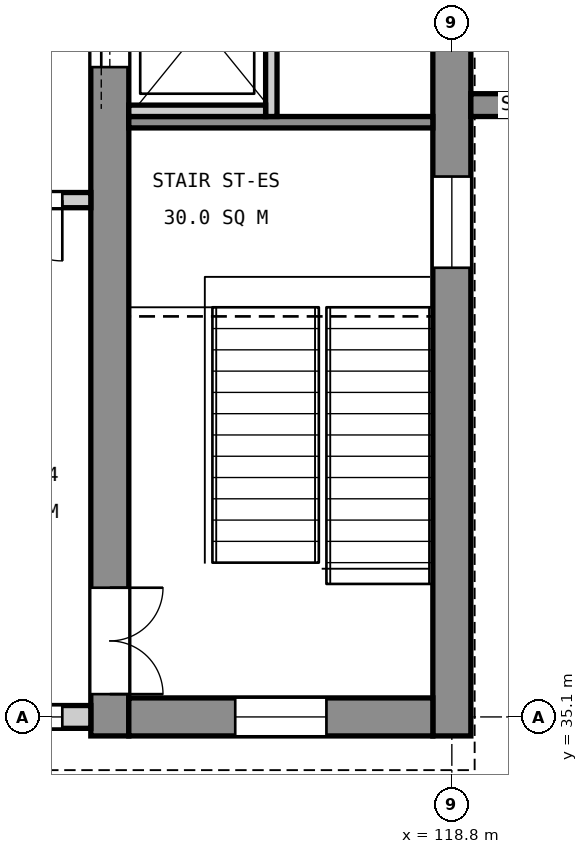
"""IFC4 building model, lengths in metres.
Left out: names, types, materials, properties, quantities, classifications, styles, units other than length and angle.
Written with IfcOpenShell. Run it as: python <this file> out.ifc"""

import sys

from ifc_helpers import new_model, si_unit, direction, frame, frame_2d, origin, place, context, subcontext, project, spatial, rectangle, extrude, element, fill, save


model = new_model("IFC4")
c1 = context("Model", 3, precision=1e-05, world=origin(), true_north=direction((0.0, 1.0)))
c2 = subcontext(c1, "Body", "Model", "MODEL_VIEW")
j1 = project(units=[si_unit("LENGTHUNIT", "METRE"), si_unit("PLANEANGLEUNIT", "RADIAN")], contexts=[c1])
p1 = place(None, origin())
s1 = spatial("IfcSite", under=j1, at=p1, CompositionType="ELEMENT")
p2 = place(p1, origin())
s2 = spatial("IfcBuilding", under=s1, at=p2, CompositionType="ELEMENT")
p3 = place(p2, frame((0.0, 0.0, 27.0)))
s3 = spatial("IfcBuildingStorey", under=s2, at=p3, CompositionType="ELEMENT", Elevation=27.0)
p4 = place(p3, frame((118.8, 34.85, 0.0), z_axis=(0.0, 0.0, 1.0), x_axis=(0.0, 1.0, 0.0)))
e1 = element("IfcWall", 1, at=p4, inside=s3, PredefinedType="SHEAR", context=c2, shape_type="SweptSolid", body=[
    extrude(rectangle(XDim=11.3, YDim=0.5, at=frame_2d((5.65, 0.0))), origin(), (0.0, 0.0, 1.0), 4.55),
])
p5 = place(p4, frame((6.16, 0.0, 3.4)))
e2 = element("IfcOpeningElement", 2, at=p5, cuts=e1, PredefinedType="OPENING", context=c2, shape_type="SweptSolid", body=[
    extrude(rectangle(XDim=1.2, YDim=0.9, at=frame_2d((0.6, 0.45))), frame((0.0, 0.26, 0.0), z_axis=(0.0, -1.0, 0.0), x_axis=(1.0, 0.0, 0.0)), (0.0, 0.0, 1.0), 0.52),
])
p6 = place(p3, frame((114.3, 34.85, 0.0), z_axis=(0.0, 0.0, 1.0), x_axis=(0.0, 1.0, 0.0)))
e3 = element("IfcWall", 3, at=p6, inside=s3, PredefinedType="SHEAR", context=c2, shape_type="SweptSolid", body=[
    extrude(rectangle(XDim=11.3, YDim=0.5, at=frame_2d((5.65, 0.0))), origin(), (0.0, 0.0, 1.0), 4.55),
])
p7 = place(p6, frame((0.55, 0.0, 0.0)))
e4 = element("IfcOpeningElement", 4, at=p7, cuts=e3, PredefinedType="OPENING", context=c2, shape_type="SweptSolid", body=[
    extrude(rectangle(XDim=1.4, YDim=2.1, at=frame_2d((0.7, 1.05))), frame((0.0, 0.26, 0.0), z_axis=(0.0, -1.0, 0.0), x_axis=(1.0, 0.0, 0.0)), (0.0, 0.0, 1.0), 0.52),
])
p8 = place(p6, frame((8.8, 0.0, 0.0)))
e5 = element("IfcOpeningElement", 5, at=p8, cuts=e3, PredefinedType="OPENING", context=c2, shape_type="SweptSolid", body=[
    extrude(rectangle(XDim=1.1, YDim=2.1, at=frame_2d((0.55, 1.05))), frame((0.0, 0.26, 0.0), z_axis=(0.0, -1.0, 0.0), x_axis=(1.0, 0.0, 0.0)), (0.0, 0.0, 1.0), 0.52),
])
p9 = place(p3, frame((118.55, 35.1, 0.0), z_axis=(0.0, 0.0, 1.0), x_axis=(-1.0, 0.0, 0.0)))
e6 = element("IfcWall", 6, at=p9, inside=s3, PredefinedType="SHEAR", context=c2, shape_type="SweptSolid", body=[
    extrude(rectangle(XDim=4.0, YDim=0.5, at=frame_2d((2.0, 0.0))), origin(), (0.0, 0.0, 1.0), 4.55),
])
p10 = place(p9, frame((1.4, 0.0, 3.4)))
e7 = element("IfcOpeningElement", 7, at=p10, cuts=e6, PredefinedType="OPENING", context=c2, shape_type="SweptSolid", body=[
    extrude(rectangle(XDim=1.2, YDim=0.9, at=frame_2d((0.6, 0.45))), frame((0.0, 0.26, 0.0), z_axis=(0.0, -1.0, 0.0), x_axis=(1.0, 0.0, 0.0)), (0.0, 0.0, 1.0), 0.52),
])
p11 = place(p3, frame((119.05, 43.15, 0.0), z_axis=(0.0, 0.0, 1.0), x_axis=(1.0, 0.0, 0.0)))
e8 = element("IfcWall", 8, at=p11, inside=s3, PredefinedType="SHEAR", context=c2, shape_type="SweptSolid", body=[
    extrude(rectangle(XDim=1.25, YDim=0.3, at=frame_2d((0.625, 0.0))), origin(), (0.0, 0.0, 1.0), 4.8),
])
p12 = place(p3, frame((118.55, 42.925, 0.0), z_axis=(0.0, 0.0, 1.0), x_axis=(-1.0, 0.0, 0.0)))
e9 = element("IfcWall", 9, at=p12, inside=s3, PredefinedType="SOLIDWALL", context=c2, shape_type="SweptSolid", body=[
    extrude(rectangle(XDim=4.0, YDim=0.15, at=frame_2d((2.0, 0.0))), origin(), (0.0, 0.0, 1.0), 4.55),
])
p13 = place(p3, frame((116.425, 43.0, 0.0), z_axis=(0.0, 0.0, 1.0), x_axis=(0.0, 1.0, 0.0)))
e10 = element("IfcWall", 10, at=p13, inside=s3, PredefinedType="SOLIDWALL", context=c2, shape_type="SweptSolid", body=[
    extrude(rectangle(XDim=2.65, YDim=0.15, at=frame_2d((1.325, 0.0))), origin(), (0.0, 0.0, 1.0), 4.8),
])
p14 = place(p3, frame((116.35, 43.075, 0.0), z_axis=(0.0, 0.0, 1.0), x_axis=(-1.0, 0.0, 0.0)))
e11 = element("IfcWall", 11, at=p14, inside=s3, PredefinedType="SOLIDWALL", context=c2, shape_type="SweptSolid", body=[
    extrude(rectangle(XDim=1.8, YDim=0.15, at=frame_2d((0.9, 0.0))), origin(), (0.0, 0.0, 1.0), 4.8),
])
p15 = place(p3, frame((114.05, 35.1, 0.0), z_axis=(0.0, 0.0, 1.0), x_axis=(-1.0, 0.0, 0.0)))
e12 = element("IfcWall", 12, at=p15, inside=s3, PredefinedType="STANDARD", context=c2, shape_type="SweptSolid", body=[
    extrude(rectangle(XDim=1.95, YDim=0.3, at=frame_2d((0.975, 0.0))), origin(), (0.0, 0.0, 1.0), 3.85),
])
p16 = place(p15, frame((0.375, 0.0, 0.9)))
e13 = element("IfcOpeningElement", 13, at=p16, cuts=e12, PredefinedType="OPENING", context=c2, shape_type="SweptSolid", body=[
    extrude(rectangle(XDim=1.2, YDim=2.4, at=frame_2d((0.6, 1.2))), frame((0.0, 0.16, 0.0), z_axis=(0.0, -1.0, 0.0), x_axis=(1.0, 0.0, 0.0)), (0.0, 0.0, 1.0), 0.32),
])
p17 = place(p3, frame((114.05, 41.9, 0.0), z_axis=(0.0, 0.0, 1.0), x_axis=(-1.0, 0.0, 0.0)))
e14 = element("IfcWall", 14, at=p17, inside=s3, PredefinedType="PARTITIONING", context=c2, shape_type="SweptSolid", body=[
    extrude(rectangle(XDim=2.35, YDim=0.2, at=frame_2d((1.175, 0.0))), origin(), (0.0, 0.0, 1.0), 3.55),
])
p18 = place(p17, frame((0.375, 0.0, 0.0)))
e15 = element("IfcOpeningElement", 15, at=p18, cuts=e14, PredefinedType="OPENING", context=c2, shape_type="SweptSolid", body=[
    extrude(rectangle(XDim=1.6, YDim=2.1, at=frame_2d((0.8, 1.05))), frame((0.0, 0.11, 0.0), z_axis=(0.0, -1.0, 0.0), x_axis=(1.0, 0.0, 0.0)), (0.0, 0.0, 1.0), 0.22),
])
p19 = place(p7, frame((1.4, 0.0, 0.0), z_axis=(0.0, 0.0, 1.0), x_axis=(-1.0, 0.0, 0.0)))
e16 = element("IfcDoor", 16, at=p19, inside=s3, OperationType="DOUBLE_DOOR_SINGLE_SWING", PredefinedType="DOOR", context=c2, shape_type="SweptSolid", body=[
    extrude(rectangle(XDim=1.4, YDim=2.1, at=frame_2d((0.7, 1.05))), frame((0.0, 0.025, 0.0), z_axis=(0.0, -1.0, 0.0), x_axis=(1.0, 0.0, 0.0)), (0.0, 0.0, 1.0), 0.05),
])
fill(e4, e16)
p20 = place(p8, origin())
e17 = element("IfcDoor", 17, at=p20, inside=s3, OperationType="SLIDING_TO_LEFT", PredefinedType="DOOR", context=c2, shape_type="SweptSolid", body=[
    extrude(rectangle(XDim=1.1, YDim=2.1, at=frame_2d((0.55, 1.05))), frame((0.0, 0.025, 0.0), z_axis=(0.0, -1.0, 0.0), x_axis=(1.0, 0.0, 0.0)), (0.0, 0.0, 1.0), 0.05),
])
fill(e5, e17)
p21 = place(p16, origin())
e18 = element("IfcWindow", 18, at=p21, inside=s3, PartitioningType="SINGLE_PANEL", PredefinedType="WINDOW", context=c2, shape_type="SweptSolid", body=[
    extrude(rectangle(XDim=1.2, YDim=2.4, at=frame_2d((0.6, 1.2))), frame((0.0, 0.03, 0.0), z_axis=(0.0, -1.0, 0.0), x_axis=(1.0, 0.0, 0.0)), (0.0, 0.0, 1.0), 0.06),
])
fill(e13, e18)
p22 = place(p5, origin())
e19 = element("IfcWindow", 19, at=p22, inside=s3, PartitioningType="SINGLE_PANEL", PredefinedType="WINDOW", context=c2, shape_type="SweptSolid", body=[
    extrude(rectangle(XDim=1.2, YDim=0.9, at=frame_2d((0.6, 0.45))), frame((0.0, 0.03, 0.0), z_axis=(0.0, -1.0, 0.0), x_axis=(1.0, 0.0, 0.0)), (0.0, 0.0, 1.0), 0.06),
])
fill(e2, e19)
p23 = place(p10, origin())
e20 = element("IfcWindow", 20, at=p23, inside=s3, PartitioningType="SINGLE_PANEL", PredefinedType="WINDOW", context=c2, shape_type="SweptSolid", body=[
    extrude(rectangle(XDim=1.2, YDim=0.9, at=frame_2d((0.6, 0.45))), frame((0.0, 0.03, 0.0), z_axis=(0.0, -1.0, 0.0), x_axis=(1.0, 0.0, 0.0)), (0.0, 0.0, 1.0), 0.06),
])
fill(e7, e20)
p24 = place(p18, origin())
e21 = element("IfcDoor", 21, at=p24, inside=s3, OperationType="DOUBLE_DOOR_SINGLE_SWING", PredefinedType="DOOR", context=c2, shape_type="SweptSolid", body=[
    extrude(rectangle(XDim=1.6, YDim=2.1, at=frame_2d((0.8, 1.05))), frame((0.0, 0.025, 0.0), z_axis=(0.0, -1.0, 0.0), x_axis=(1.0, 0.0, 0.0)), (0.0, 0.0, 1.0), 0.05),
])
fill(e15, e21)
save(model, sys.argv[1])
